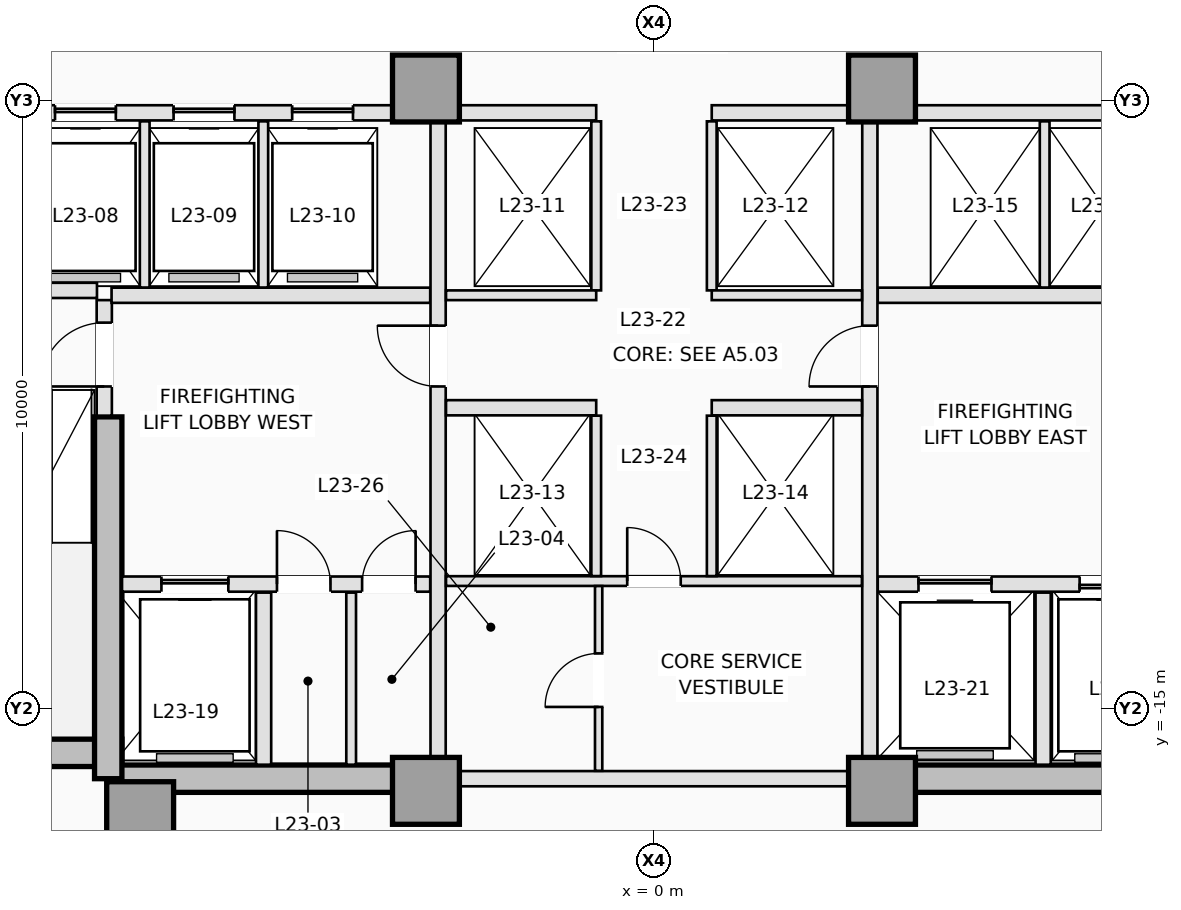
"""IFC4 building model, lengths in metres.
Left out: names, types, materials, properties, quantities, classifications, styles, units other than length and angle.
Written with IfcOpenShell. Run it as: python <this file> out.ifc"""

import sys

from ifc_helpers import new_model, si_unit, direction, frame, frame_2d, origin, origin_2d, place, context, subcontext, project, spatial, rectangle, extrude, element, fill, save


model = new_model("IFC4")
c1 = context("Model", 3, precision=1e-05, world=origin(), true_north=direction((0.0, 1.0)))
c2 = subcontext(c1, "Body", "Model", "MODEL_VIEW")
j1 = project(units=[si_unit("LENGTHUNIT", "METRE"), si_unit("PLANEANGLEUNIT", "RADIAN")], contexts=[c1])
p1 = place(None, origin())
s1 = spatial("IfcSite", under=j1, at=p1, CompositionType="ELEMENT")
p2 = place(p1, origin())
s2 = spatial("IfcBuilding", under=s1, at=p2, CompositionType="ELEMENT")
p3 = place(p2, frame((0.0, 0.0, 87.1)))
s3 = spatial("IfcBuildingStorey", under=s2, at=p3, CompositionType="ELEMENT", Elevation=87.1)
p4 = place(p3, frame((-12.65, -15.725, 0.0), z_axis=(0.0, 0.0, 1.0), x_axis=(1.0, 0.0, 0.0)))
e1 = element("IfcWall", 1, at=p4, inside=s3, PredefinedType="SHEAR", context=c2, shape_type="SweptSolid", body=[
    extrude(rectangle(XDim=3.9, YDim=0.45, at=frame_2d((1.95, 0.0))), origin(), (0.0, 0.0, 1.0), 3.5),
])
for number, where, z_axis, x_axis in (
    (2, (-8.975, -16.15, 0.0), (0.0, 0.0, 1.0), (1.0, 0.0, 0.0)),
    (3, (3.75, -16.15, 0.0), (0.0, 0.0, 1.0), (1.0, 0.0, 0.0)),
):
    element("IfcWall", number, at=place(p3, frame(where, z_axis=z_axis, x_axis=x_axis)), inside=s3, PredefinedType="SHEAR", context=c2, shape_type="SweptSolid", body=[
        extrude(rectangle(XDim=5.225, YDim=0.45, at=frame_2d((2.613, 0.0))), origin(), (0.0, 0.0, 1.0), 3.5),
    ])
p5 = place(p3, frame((-8.975, -16.15, 0.0), z_axis=(0.0, 0.0, 1.0), x_axis=(0.0, 1.0, 0.0)))
e4 = element("IfcWall", 4, at=p5, inside=s3, PredefinedType="SHEAR", context=c2, shape_type="SweptSolid", body=[
    extrude(rectangle(XDim=5.95, YDim=0.45, at=frame_2d((2.975, 0.0))), origin(), (0.0, 0.0, 1.0), 3.5),
])
for number, where, z_axis, x_axis in (
    (5, (-8.45, -16.75, 0.0), (0.0, 0.0, 1.0), (1.0, 0.0, 0.0)),
    (6, (-3.75, -16.35, 0.0), (0.0, 0.0, 1.0), (1.0, 0.0, 0.0)),
    (7, (3.75, -16.35, 0.0), (0.0, 0.0, 1.0), (1.0, 0.0, 0.0)),
    (8, (-3.75, -4.8, 0.0), (0.0, 0.0, 1.0), (1.0, 0.0, 0.0)),
    (9, (3.75, -4.8, 0.0), (0.0, 0.0, 1.0), (1.0, 0.0, 0.0)),
):
    element("IfcColumn", number, at=place(p3, frame(where, z_axis=z_axis, x_axis=x_axis)), inside=s3, PredefinedType="COLUMN", context=c2, shape_type="SweptSolid", body=[
        extrude(rectangle(XDim=1.1, YDim=1.1, at=origin_2d()), origin(), (0.0, 0.0, 1.0), 3.5),
    ])
p6 = place(p3, frame((-9.04, -10.18, 0.0), z_axis=(0.0, 0.0, 1.0), x_axis=(0.0, 1.0, 0.0)))
e10 = element("IfcWall", 10, at=p6, inside=s3, PredefinedType="PARTITIONING", context=c2, shape_type="SweptSolid", body=[
    extrude(rectangle(XDim=1.9, YDim=0.25, at=frame_2d((0.95, 0.0))), origin(), (0.0, 0.0, 1.0), 3.14),
])
p7 = place(p6, frame((0.48, 0.0, 0.0)))
e11 = element("IfcOpeningElement", 11, at=p7, cuts=e10, PredefinedType="OPENING", context=c2, shape_type="SweptSolid", body=[
    extrude(rectangle(XDim=1.05, YDim=2.15, at=frame_2d((0.525, 1.075))), frame((0.0, 0.135, 0.0), z_axis=(0.0, -1.0, 0.0), x_axis=(1.0, 0.0, 0.0)), (0.0, 0.0, 1.0), 0.27),
])
p8 = place(p3, frame((-12.38, -8.12, 0.0), z_axis=(0.0, 0.0, 1.0), x_axis=(1.0, 0.0, 0.0)))
e12 = element("IfcWall", 12, at=p8, inside=s3, PredefinedType="PARTITIONING", context=c2, shape_type="SweptSolid", body=[
    extrude(rectangle(XDim=3.22, YDim=0.25, at=frame_2d((1.61, 0.0))), origin(), (0.0, 0.0, 1.0), 3.14),
])
p9 = place(p3, frame((-8.748, -12.95, 0.0), z_axis=(0.0, 0.0, 1.0), x_axis=(1.0, 0.0, 0.0)))
e13 = element("IfcWall", 13, at=p9, inside=s3, PredefinedType="PARTITIONING", context=c2, shape_type="SweptSolid", body=[
    extrude(rectangle(XDim=5.068, YDim=0.25, at=frame_2d((2.534, 0.0))), origin(), (0.0, 0.0, 1.0), 3.14),
])
p10 = place(p9, frame((0.648, 0.0, 0.0)))
e14 = element("IfcOpeningElement", 14, at=p10, cuts=e13, PredefinedType="OPENING", context=c2, shape_type="SweptSolid", body=[
    extrude(rectangle(XDim=1.1, YDim=2.15, at=frame_2d((0.55, 1.075))), frame((0.0, 0.135, 0.0), z_axis=(0.0, -1.0, 0.0), x_axis=(1.0, 0.0, 0.0)), (0.0, 0.0, 1.0), 0.27),
])
p11 = place(p9, frame((2.548, 0.0, 0.0)))
e15 = element("IfcOpeningElement", 15, at=p11, cuts=e13, PredefinedType="OPENING", context=c2, shape_type="SweptSolid", body=[
    extrude(rectangle(XDim=0.88, YDim=2.1, at=frame_2d((0.44, 1.05))), frame((0.0, 0.135, 0.0), z_axis=(0.0, -1.0, 0.0), x_axis=(1.0, 0.0, 0.0)), (0.0, 0.0, 1.0), 0.27),
])
p12 = place(p9, frame((3.948, 0.0, 0.0)))
e16 = element("IfcOpeningElement", 16, at=p12, cuts=e13, PredefinedType="OPENING", context=c2, shape_type="SweptSolid", body=[
    extrude(rectangle(XDim=0.88, YDim=2.1, at=frame_2d((0.44, 1.05))), frame((0.0, 0.135, 0.0), z_axis=(0.0, -1.0, 0.0), x_axis=(1.0, 0.0, 0.0)), (0.0, 0.0, 1.0), 0.27),
])
p13 = place(p3, frame((3.68, -12.95, 0.0), z_axis=(0.0, 0.0, 1.0), x_axis=(1.0, 0.0, 0.0)))
e17 = element("IfcWall", 17, at=p13, inside=s3, PredefinedType="PARTITIONING", context=c2, shape_type="SweptSolid", body=[
    extrude(rectangle(XDim=5.068, YDim=0.25, at=frame_2d((2.534, 0.0))), origin(), (0.0, 0.0, 1.0), 3.14),
])
p14 = place(p13, frame((3.32, 0.0, 0.0)))
e18 = element("IfcOpeningElement", 18, at=p14, cuts=e17, PredefinedType="OPENING", context=c2, shape_type="SweptSolid", body=[
    extrude(rectangle(XDim=1.1, YDim=2.15, at=frame_2d((0.55, 1.075))), frame((0.0, 0.135, 0.0), z_axis=(0.0, -1.0, 0.0), x_axis=(1.0, 0.0, 0.0)), (0.0, 0.0, 1.0), 0.27),
])
p15 = place(p13, frame((0.67, 0.0, 0.0)))
e19 = element("IfcOpeningElement", 19, at=p15, cuts=e17, PredefinedType="OPENING", context=c2, shape_type="SweptSolid", body=[
    extrude(rectangle(XDim=1.2, YDim=2.15, at=frame_2d((0.6, 1.075))), frame((0.0, 0.135, 0.0), z_axis=(0.0, -1.0, 0.0), x_axis=(1.0, 0.0, 0.0)), (0.0, 0.0, 1.0), 0.27),
])
p16 = place(p3, frame((-6.42, -15.92, 0.0), z_axis=(0.0, 0.0, 1.0), x_axis=(0.0, 1.0, 0.0)))
e20 = element("IfcWall", 20, at=p16, inside=s3, PredefinedType="PARTITIONING", context=c2, shape_type="SweptSolid", body=[
    extrude(rectangle(XDim=2.83, YDim=0.25, at=frame_2d((1.415, 0.0))), origin(), (0.0, 0.0, 1.0), 3.14),
])
p17 = place(p3, frame((-4.98, -15.92, 0.0), z_axis=(0.0, 0.0, 1.0), x_axis=(0.0, 1.0, 0.0)))
e21 = element("IfcWall", 21, at=p17, inside=s3, PredefinedType="PARTITIONING", context=c2, shape_type="SweptSolid", body=[
    extrude(rectangle(XDim=2.83, YDim=0.16, at=frame_2d((1.415, 0.0))), origin(), (0.0, 0.0, 1.0), 3.14),
])
p18 = place(p3, frame((6.4, -15.92, 0.0), z_axis=(0.0, 0.0, 1.0), x_axis=(0.0, 1.0, 0.0)))
e22 = element("IfcWall", 22, at=p18, inside=s3, PredefinedType="PARTITIONING", context=c2, shape_type="SweptSolid", body=[
    extrude(rectangle(XDim=2.83, YDim=0.25, at=frame_2d((1.415, 0.0))), origin(), (0.0, 0.0, 1.0), 3.14),
])
for number, where, z_axis, x_axis in (
    (23, (-8.92, -8.2, 0.0), (0.0, 0.0, 1.0), (1.0, 0.0, 0.0)),
    (24, (3.68, -8.2, 0.0), (0.0, 0.0, 1.0), (1.0, 0.0, 0.0)),
):
    element("IfcWall", number, at=place(p3, frame(where, z_axis=z_axis, x_axis=x_axis)), inside=s3, PredefinedType="PARTITIONING", context=c2, shape_type="SweptSolid", body=[
        extrude(rectangle(XDim=5.24, YDim=0.25, at=frame_2d((2.62, 0.0))), origin(), (0.0, 0.0, 1.0), 3.14),
    ])
p19 = place(p3, frame((-3.55, -15.798, 0.0), z_axis=(0.0, 0.0, 1.0), x_axis=(0.0, 1.0, 0.0)))
e25 = element("IfcWall", 25, at=p19, inside=s3, PredefinedType="PARTITIONING", context=c2, shape_type="SweptSolid", body=[
    extrude(rectangle(XDim=10.446, YDim=0.25, at=frame_2d((5.223, 0.0))), origin(), (0.0, 0.0, 1.0), 3.14),
])
p20 = place(p19, frame((6.098, 0.0, 0.0)))
e26 = element("IfcOpeningElement", 26, at=p20, cuts=e25, PredefinedType="OPENING", context=c2, shape_type="SweptSolid", body=[
    extrude(rectangle(XDim=1.0, YDim=2.15, at=frame_2d((0.5, 1.075))), frame((0.0, 0.135, 0.0), z_axis=(0.0, -1.0, 0.0), x_axis=(1.0, 0.0, 0.0)), (0.0, 0.0, 1.0), 0.27),
])
p21 = place(p3, frame((3.55, -15.798, 0.0), z_axis=(0.0, 0.0, 1.0), x_axis=(0.0, 1.0, 0.0)))
e27 = element("IfcWall", 27, at=p21, inside=s3, PredefinedType="PARTITIONING", context=c2, shape_type="SweptSolid", body=[
    extrude(rectangle(XDim=10.446, YDim=0.25, at=frame_2d((5.223, 0.0))), origin(), (0.0, 0.0, 1.0), 3.14),
])
p22 = place(p21, frame((6.098, 0.0, 0.0)))
e28 = element("IfcOpeningElement", 28, at=p22, cuts=e27, PredefinedType="OPENING", context=c2, shape_type="SweptSolid", body=[
    extrude(rectangle(XDim=1.0, YDim=2.15, at=frame_2d((0.5, 1.075))), frame((0.0, 0.135, 0.0), z_axis=(0.0, -1.0, 0.0), x_axis=(1.0, 0.0, 0.0)), (0.0, 0.0, 1.0), 0.27),
])
p23 = place(p3, frame((-12.398, -5.2, 0.0), z_axis=(0.0, 0.0, 1.0), x_axis=(1.0, 0.0, 0.0)))
e29 = element("IfcWall", 29, at=p23, inside=s3, PredefinedType="PARTITIONING", context=c2, shape_type="SweptSolid", body=[
    extrude(rectangle(XDim=8.096, YDim=0.25, at=frame_2d((4.048, 0.0))), origin(), (0.0, 0.0, 1.0), 3.14),
])
p24 = place(p23, frame((0.598, 0.0, 0.0)))
e30 = element("IfcOpeningElement", 30, at=p24, cuts=e29, PredefinedType="OPENING", context=c2, shape_type="SweptSolid", body=[
    extrude(rectangle(XDim=1.0, YDim=2.15, at=frame_2d((0.5, 1.075))), frame((0.0, 0.135, 0.0), z_axis=(0.0, -1.0, 0.0), x_axis=(1.0, 0.0, 0.0)), (0.0, 0.0, 1.0), 0.27),
])
p25 = place(p23, frame((2.548, 0.0, 0.0)))
e31 = element("IfcOpeningElement", 31, at=p25, cuts=e29, PredefinedType="OPENING", context=c2, shape_type="SweptSolid", body=[
    extrude(rectangle(XDim=1.0, YDim=2.15, at=frame_2d((0.5, 1.075))), frame((0.0, 0.135, 0.0), z_axis=(0.0, -1.0, 0.0), x_axis=(1.0, 0.0, 0.0)), (0.0, 0.0, 1.0), 0.27),
])
p26 = place(p23, frame((4.498, 0.0, 0.0)))
e32 = element("IfcOpeningElement", 32, at=p26, cuts=e29, PredefinedType="OPENING", context=c2, shape_type="SweptSolid", body=[
    extrude(rectangle(XDim=1.0, YDim=2.15, at=frame_2d((0.5, 1.075))), frame((0.0, 0.135, 0.0), z_axis=(0.0, -1.0, 0.0), x_axis=(1.0, 0.0, 0.0)), (0.0, 0.0, 1.0), 0.27),
])
p27 = place(p23, frame((6.448, 0.0, 0.0)))
e33 = element("IfcOpeningElement", 33, at=p27, cuts=e29, PredefinedType="OPENING", context=c2, shape_type="SweptSolid", body=[
    extrude(rectangle(XDim=1.0, YDim=2.15, at=frame_2d((0.5, 1.075))), frame((0.0, 0.135, 0.0), z_axis=(0.0, -1.0, 0.0), x_axis=(1.0, 0.0, 0.0)), (0.0, 0.0, 1.0), 0.27),
])
p28 = place(p3, frame((4.302, -5.2, 0.0), z_axis=(0.0, 0.0, 1.0), x_axis=(1.0, 0.0, 0.0)))
e34 = element("IfcWall", 34, at=p28, inside=s3, PredefinedType="PARTITIONING", context=c2, shape_type="SweptSolid", body=[
    extrude(rectangle(XDim=8.096, YDim=0.25, at=frame_2d((4.048, 0.0))), origin(), (0.0, 0.0, 1.0), 3.14),
])
for number, where, z_axis, x_axis in (
    (35, (-3.198, -5.2, 0.0), (0.0, 0.0, 1.0), (1.0, 0.0, 0.0)),
    (36, (0.95, -5.2, 0.0), (0.0, 0.0, 1.0), (1.0, 0.0, 0.0)),
):
    element("IfcWall", number, at=place(p3, frame(where, z_axis=z_axis, x_axis=x_axis)), inside=s3, PredefinedType="PARTITIONING", context=c2, shape_type="SweptSolid", body=[
        extrude(rectangle(XDim=2.248, YDim=0.25, at=frame_2d((1.124, 0.0))), origin(), (0.0, 0.0, 1.0), 3.14),
    ])
for number, where, z_axis, x_axis in (
    (37, (-8.375, -8.073, 0.0), (0.0, 0.0, 1.0), (0.0, 1.0, 0.0)),
    (38, (-6.425, -8.073, 0.0), (0.0, 0.0, 1.0), (0.0, 1.0, 0.0)),
    (39, (6.425, -8.073, 0.0), (0.0, 0.0, 1.0), (0.0, 1.0, 0.0)),
):
    element("IfcWall", number, at=place(p3, frame(where, z_axis=z_axis, x_axis=x_axis)), inside=s3, PredefinedType="PARTITIONING", context=c2, shape_type="SweptSolid", body=[
        extrude(rectangle(XDim=2.733, YDim=0.16, at=frame_2d((1.366, 0.0))), origin(), (0.0, 0.0, 1.0), 3.14),
    ])
p29 = place(p3, frame((-3.198, -16.15, 0.0), z_axis=(0.0, 0.0, 1.0), x_axis=(1.0, 0.0, 0.0)))
e40 = element("IfcWall", 40, at=p29, inside=s3, PredefinedType="PARTITIONING", context=c2, shape_type="SweptSolid", body=[
    extrude(rectangle(XDim=6.396, YDim=0.25, at=frame_2d((3.198, 0.0))), origin(), (0.0, 0.0, 1.0), 2.19),
])
for number, where, z_axis, x_axis in (
    (41, (-0.95, -8.12, 0.0), (0.0, 0.0, 1.0), (0.0, 1.0, 0.0)),
    (42, (0.95, -8.12, 0.0), (0.0, 0.0, 1.0), (0.0, 1.0, 0.0)),
):
    element("IfcWall", number, at=place(p3, frame(where, z_axis=z_axis, x_axis=x_axis)), inside=s3, PredefinedType="PARTITIONING", context=c2, shape_type="SweptSolid", body=[
        extrude(rectangle(XDim=2.78, YDim=0.16, at=frame_2d((1.39, 0.0))), origin(), (0.0, 0.0, 1.0), 3.14),
    ])
for number, where, z_axis, x_axis in (
    (43, (-3.42, -8.2, 0.0), (0.0, 0.0, 1.0), (1.0, 0.0, 0.0)),
    (44, (0.95, -8.2, 0.0), (0.0, 0.0, 1.0), (1.0, 0.0, 0.0)),
):
    element("IfcWall", number, at=place(p3, frame(where, z_axis=z_axis, x_axis=x_axis)), inside=s3, PredefinedType="PARTITIONING", context=c2, shape_type="SweptSolid", body=[
        extrude(rectangle(XDim=2.47, YDim=0.16, at=frame_2d((1.235, 0.0))), origin(), (0.0, 0.0, 1.0), 3.14),
    ])
for number, where, z_axis, x_axis in (
    (45, (-3.42, -10.05, 0.0), (0.0, 0.0, 1.0), (1.0, 0.0, 0.0)),
    (46, (0.95, -10.05, 0.0), (0.0, 0.0, 1.0), (1.0, 0.0, 0.0)),
):
    element("IfcWall", number, at=place(p3, frame(where, z_axis=z_axis, x_axis=x_axis)), inside=s3, PredefinedType="PARTITIONING", context=c2, shape_type="SweptSolid", body=[
        extrude(rectangle(XDim=2.47, YDim=0.25, at=frame_2d((1.235, 0.0))), origin(), (0.0, 0.0, 1.0), 3.14),
    ])
p30 = place(p3, frame((-3.42, -12.9, 0.0), z_axis=(0.0, 0.0, 1.0), x_axis=(1.0, 0.0, 0.0)))
e47 = element("IfcWall", 47, at=p30, inside=s3, PredefinedType="PARTITIONING", context=c2, shape_type="SweptSolid", body=[
    extrude(rectangle(XDim=6.84, YDim=0.16, at=frame_2d((3.42, 0.0))), origin(), (0.0, 0.0, 1.0), 3.14),
])
p31 = place(p30, frame((2.98, 0.0, 0.0)))
e48 = element("IfcOpeningElement", 48, at=p31, cuts=e47, PredefinedType="OPENING", context=c2, shape_type="SweptSolid", body=[
    extrude(rectangle(XDim=0.88, YDim=2.12, at=frame_2d((0.44, 1.06))), frame((0.0, 0.09, 0.0), z_axis=(0.0, -1.0, 0.0), x_axis=(1.0, 0.0, 0.0)), (0.0, 0.0, 1.0), 0.18),
])
for number, where, z_axis, x_axis in (
    (49, (-0.95, -12.818, 0.0), (0.0, 0.0, 1.0), (0.0, 1.0, 0.0)),
    (50, (0.95, -12.818, 0.0), (0.0, 0.0, 1.0), (0.0, 1.0, 0.0)),
):
    element("IfcWall", number, at=place(p3, frame(where, z_axis=z_axis, x_axis=x_axis)), inside=s3, PredefinedType="PARTITIONING", context=c2, shape_type="SweptSolid", body=[
        extrude(rectangle(XDim=2.638, YDim=0.16, at=frame_2d((1.319, 0.0))), origin(), (0.0, 0.0, 1.0), 3.14),
    ])
p32 = place(p3, frame((-0.91, -16.02, 0.0), z_axis=(0.0, 0.0, 1.0), x_axis=(0.0, 1.0, 0.0)))
e51 = element("IfcWall", 51, at=p32, inside=s3, PredefinedType="PARTITIONING", context=c2, shape_type="SweptSolid", body=[
    extrude(rectangle(XDim=3.038, YDim=0.12, at=frame_2d((1.519, 0.0))), origin(), (0.0, 0.0, 1.0), 3.14),
])
p33 = place(p32, frame((1.05, 0.0, 0.0)))
e52 = element("IfcOpeningElement", 52, at=p33, cuts=e51, PredefinedType="OPENING", context=c2, shape_type="SweptSolid", body=[
    extrude(rectangle(XDim=0.88, YDim=2.12, at=frame_2d((0.44, 1.06))), frame((0.0, 0.07, 0.0), z_axis=(0.0, -1.0, 0.0), x_axis=(1.0, 0.0, 0.0)), (0.0, 0.0, 1.0), 0.14),
])
p34 = place(p25, origin())
e53 = element("IfcDoor", 53, at=p34, inside=s3, OperationType="SLIDING_TO_LEFT", PredefinedType="DOOR", context=c2, shape_type="SweptSolid", body=[
    extrude(rectangle(XDim=1.0, YDim=2.15, at=frame_2d((0.5, 1.075))), frame((0.0, 0.025, 0.0), z_axis=(0.0, -1.0, 0.0), x_axis=(1.0, 0.0, 0.0)), (0.0, 0.0, 1.0), 0.05),
])
fill(e31, e53)
p35 = place(p26, origin())
e54 = element("IfcDoor", 54, at=p35, inside=s3, OperationType="SLIDING_TO_LEFT", PredefinedType="DOOR", context=c2, shape_type="SweptSolid", body=[
    extrude(rectangle(XDim=1.0, YDim=2.15, at=frame_2d((0.5, 1.075))), frame((0.0, 0.025, 0.0), z_axis=(0.0, -1.0, 0.0), x_axis=(1.0, 0.0, 0.0)), (0.0, 0.0, 1.0), 0.05),
])
fill(e32, e54)
p36 = place(p27, origin())
e55 = element("IfcDoor", 55, at=p36, inside=s3, OperationType="SLIDING_TO_LEFT", PredefinedType="DOOR", context=c2, shape_type="SweptSolid", body=[
    extrude(rectangle(XDim=1.0, YDim=2.15, at=frame_2d((0.5, 1.075))), frame((0.0, 0.025, 0.0), z_axis=(0.0, -1.0, 0.0), x_axis=(1.0, 0.0, 0.0)), (0.0, 0.0, 1.0), 0.05),
])
fill(e33, e55)
p37 = place(p10, origin())
e56 = element("IfcDoor", 56, at=p37, inside=s3, OperationType="SLIDING_TO_LEFT", PredefinedType="DOOR", context=c2, shape_type="SweptSolid", body=[
    extrude(rectangle(XDim=1.1, YDim=2.15, at=frame_2d((0.55, 1.075))), frame((0.0, 0.025, 0.0), z_axis=(0.0, -1.0, 0.0), x_axis=(1.0, 0.0, 0.0)), (0.0, 0.0, 1.0), 0.05),
])
fill(e14, e56)
p38 = place(p14, origin())
e57 = element("IfcDoor", 57, at=p38, inside=s3, OperationType="SLIDING_TO_RIGHT", PredefinedType="DOOR", context=c2, shape_type="SweptSolid", body=[
    extrude(rectangle(XDim=1.1, YDim=2.15, at=frame_2d((0.55, 1.075))), frame((0.0, 0.025, 0.0), z_axis=(0.0, -1.0, 0.0), x_axis=(1.0, 0.0, 0.0)), (0.0, 0.0, 1.0), 0.05),
])
fill(e18, e57)
p39 = place(p15, origin())
e58 = element("IfcDoor", 58, at=p39, inside=s3, OperationType="SLIDING_TO_LEFT", PredefinedType="DOOR", context=c2, shape_type="SweptSolid", body=[
    extrude(rectangle(XDim=1.2, YDim=2.15, at=frame_2d((0.6, 1.075))), frame((0.0, 0.025, 0.0), z_axis=(0.0, -1.0, 0.0), x_axis=(1.0, 0.0, 0.0)), (0.0, 0.0, 1.0), 0.05),
])
fill(e19, e58)
p40 = place(p7, origin())
e59 = element("IfcDoor", 59, at=p40, inside=s3, OperationType="SINGLE_SWING_LEFT", PredefinedType="DOOR", context=c2, shape_type="SweptSolid", body=[
    extrude(rectangle(XDim=1.05, YDim=2.15, at=frame_2d((0.525, 1.075))), frame((0.0, 0.025, 0.0), z_axis=(0.0, -1.0, 0.0), x_axis=(1.0, 0.0, 0.0)), (0.0, 0.0, 1.0), 0.05),
])
fill(e11, e59)
p41 = place(p11, origin())
e60 = element("IfcDoor", 60, at=p41, inside=s3, OperationType="SINGLE_SWING_LEFT", PredefinedType="TRAPDOOR", context=c2, shape_type="SweptSolid", body=[
    extrude(rectangle(XDim=0.88, YDim=2.1, at=frame_2d((0.44, 1.05))), frame((0.0, 0.025, 0.0), z_axis=(0.0, -1.0, 0.0), x_axis=(1.0, 0.0, 0.0)), (0.0, 0.0, 1.0), 0.05),
])
fill(e15, e60)
p42 = place(p12, origin())
e61 = element("IfcDoor", 61, at=p42, inside=s3, OperationType="SINGLE_SWING_RIGHT", PredefinedType="TRAPDOOR", context=c2, shape_type="SweptSolid", body=[
    extrude(rectangle(XDim=0.88, YDim=2.1, at=frame_2d((0.44, 1.05))), frame((0.0, 0.025, 0.0), z_axis=(0.0, -1.0, 0.0), x_axis=(1.0, 0.0, 0.0)), (0.0, 0.0, 1.0), 0.05),
])
fill(e16, e61)
p43 = place(p20, origin())
e62 = element("IfcDoor", 62, at=p43, inside=s3, OperationType="SINGLE_SWING_RIGHT", PredefinedType="DOOR", context=c2, shape_type="SweptSolid", body=[
    extrude(rectangle(XDim=1.0, YDim=2.15, at=frame_2d((0.5, 1.075))), frame((0.0, 0.025, 0.0), z_axis=(0.0, -1.0, 0.0), x_axis=(1.0, 0.0, 0.0)), (0.0, 0.0, 1.0), 0.05),
])
fill(e26, e62)
p44 = place(p22, origin())
e63 = element("IfcDoor", 63, at=p44, inside=s3, OperationType="SINGLE_SWING_LEFT", PredefinedType="DOOR", context=c2, shape_type="SweptSolid", body=[
    extrude(rectangle(XDim=1.0, YDim=2.15, at=frame_2d((0.5, 1.075))), frame((0.0, 0.025, 0.0), z_axis=(0.0, -1.0, 0.0), x_axis=(1.0, 0.0, 0.0)), (0.0, 0.0, 1.0), 0.05),
])
fill(e28, e63)
p45 = place(p31, origin())
e64 = element("IfcDoor", 64, at=p45, inside=s3, OperationType="SINGLE_SWING_LEFT", PredefinedType="DOOR", context=c2, shape_type="SweptSolid", body=[
    extrude(rectangle(XDim=0.88, YDim=2.12, at=frame_2d((0.44, 1.06))), frame((0.0, 0.025, 0.0), z_axis=(0.0, -1.0, 0.0), x_axis=(1.0, 0.0, 0.0)), (0.0, 0.0, 1.0), 0.05),
])
fill(e48, e64)
p46 = place(p33, origin())
e65 = element("IfcDoor", 65, at=p46, inside=s3, OperationType="SINGLE_SWING_LEFT", PredefinedType="DOOR", context=c2, shape_type="SweptSolid", body=[
    extrude(rectangle(XDim=0.88, YDim=2.12, at=frame_2d((0.44, 1.06))), frame((0.0, 0.025, 0.0), z_axis=(0.0, -1.0, 0.0), x_axis=(1.0, 0.0, 0.0)), (0.0, 0.0, 1.0), 0.05),
])
fill(e52, e65)
save(model, sys.argv[1])
